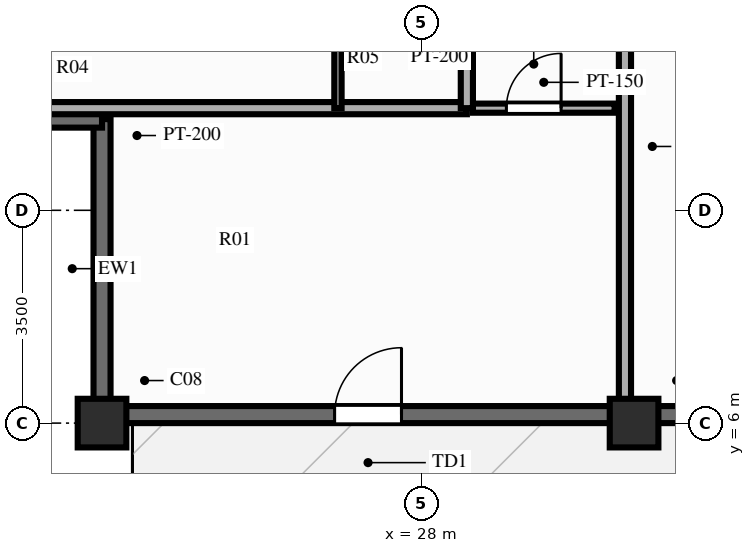
"""IFC4 building model, lengths in metres.
Left out: names, types, materials, properties, quantities, classifications, styles, units other than length and angle.
Written with IfcOpenShell. Run it as: python <this file> out.ifc"""

import sys

from ifc_helpers import new_model, si_unit, direction, frame, frame_2d, origin, origin_2d, place, context, subcontext, project, spatial, rectangle, extrude, source, transform, mapped, element, fill, save


model = new_model("IFC4")
c1 = context("Model", 3, precision=1e-05, world=origin(), true_north=direction((0.0, 1.0)))
c2 = subcontext(c1, "Body", "Model", "MODEL_VIEW")
j1 = project(units=[si_unit("LENGTHUNIT", "METRE"), si_unit("PLANEANGLEUNIT", "RADIAN")], contexts=[c1])
p1 = place(None, origin())
s1 = spatial("IfcSite", under=j1, at=p1, CompositionType="ELEMENT")
p2 = place(p1, origin())
s2 = spatial("IfcBuilding", under=s1, at=p2, CompositionType="ELEMENT")
p3 = place(p2, frame((0.0, 0.0, 172.9)))
s3 = spatial("IfcBuildingStorey", under=s2, at=p3, CompositionType="ELEMENT", Elevation=172.9)
m1 = source(origin(), c2, "Body", "SweptSolid", [
    extrude(rectangle(XDim=0.8, YDim=0.8, at=origin_2d()), origin(), (0.0, 0.0, 1.0), 3.9),
])
for number, where, z_axis, x_axis in (
    (1, (22.75, 6.0, 0.0), (0.0, 0.0, 1.0), (1.0, 0.0, 0.0)),
    (2, (31.5, 6.0, 0.0), (0.0, 0.0, 1.0), (1.0, 0.0, 0.0)),
):
    element("IfcColumn", number, at=place(p3, frame(where, z_axis=z_axis, x_axis=x_axis)), inside=s3, PredefinedType="COLUMN", context=c2, shape_type="MappedRepresentation", body=[
        mapped(m1, transform((0.0, 0.0, 0.0), scale=1.0)),
    ])
p4 = place(p3, frame((22.75, 6.14, 0.0), z_axis=(0.0, 0.0, 1.0), x_axis=(1.0, 0.0, 0.0)))
e3 = element("IfcWall", 3, at=p4, inside=s3, PredefinedType="SOLIDWALL", context=c2, shape_type="SweptSolid", body=[
    extrude(rectangle(XDim=30.5, YDim=0.28, at=frame_2d((15.25, 0.0))), origin(), (0.0, 0.0, 1.0), 2.79),
])
p5 = place(p4, frame((4.925, 0.0, 0.0), z_axis=(0.0, 0.0, 1.0), x_axis=(-1.0, 0.0, 0.0)))
e4 = element("IfcOpeningElement", 4, at=p5, cuts=e3, PredefinedType="OPENING", context=c2, shape_type="SweptSolid", body=[
    extrude(rectangle(XDim=1.1, YDim=2.15, at=frame_2d((0.55, 1.075))), frame((0.0, 0.152, 0.0), z_axis=(0.0, -1.0, 0.0), x_axis=(1.0, 0.0, 0.0)), (0.0, 0.0, 1.0), 0.304),
])
p6 = place(p4, frame((9.47, 0.0, 0.85)))
e5 = element("IfcOpeningElement", 5, at=p6, cuts=e3, PredefinedType="OPENING", context=c2, shape_type="SweptSolid", body=[
    extrude(rectangle(XDim=1.5, YDim=1.65, at=frame_2d((0.75, 0.825))), frame((0.0, 0.152, 0.0), z_axis=(0.0, -1.0, 0.0), x_axis=(1.0, 0.0, 0.0)), (0.0, 0.0, 1.0), 0.304),
])
p7 = place(p4, frame((12.45, 0.0, 0.85)))
e6 = element("IfcOpeningElement", 6, at=p7, cuts=e3, PredefinedType="OPENING", context=c2, shape_type="SweptSolid", body=[
    extrude(rectangle(XDim=1.8, YDim=1.65, at=frame_2d((0.9, 0.825))), frame((0.0, 0.152, 0.0), z_axis=(0.0, -1.0, 0.0), x_axis=(1.0, 0.0, 0.0)), (0.0, 0.0, 1.0), 0.304),
])
p8 = place(p4, frame((16.25, 0.0, 0.85)))
e7 = element("IfcOpeningElement", 7, at=p8, cuts=e3, PredefinedType="OPENING", context=c2, shape_type="SweptSolid", body=[
    extrude(rectangle(XDim=1.8, YDim=1.65, at=frame_2d((0.9, 0.825))), frame((0.0, 0.152, 0.0), z_axis=(0.0, -1.0, 0.0), x_axis=(1.0, 0.0, 0.0)), (0.0, 0.0, 1.0), 0.304),
])
p9 = place(p4, frame((19.53, 0.0, 0.85)))
e8 = element("IfcOpeningElement", 8, at=p9, cuts=e3, PredefinedType="OPENING", context=c2, shape_type="SweptSolid", body=[
    extrude(rectangle(XDim=1.5, YDim=1.65, at=frame_2d((0.75, 0.825))), frame((0.0, 0.152, 0.0), z_axis=(0.0, -1.0, 0.0), x_axis=(1.0, 0.0, 0.0)), (0.0, 0.0, 1.0), 0.304),
])
p10 = place(p4, frame((25.225, 0.0, 0.85)))
e9 = element("IfcOpeningElement", 9, at=p10, cuts=e3, PredefinedType="OPENING", context=c2, shape_type="SweptSolid", body=[
    extrude(rectangle(XDim=1.8, YDim=1.65, at=frame_2d((0.9, 0.825))), frame((0.0, 0.152, 0.0), z_axis=(0.0, -1.0, 0.0), x_axis=(1.0, 0.0, 0.0)), (0.0, 0.0, 1.0), 0.304),
])
for number, where, z_axis, x_axis in (
    (10, (22.75, 6.08, 0.0), (0.0, 0.0, 1.0), (0.0, 1.0, 0.0)),
    (11, (17.83, 11.0, 0.0), (0.0, 0.0, 1.0), (1.0, 0.0, 0.0)),
):
    element("IfcWall", number, at=place(p3, frame(where, z_axis=z_axis, x_axis=x_axis)), inside=s3, PredefinedType="SOLIDWALL", context=c2, shape_type="SweptSolid", body=[
        extrude(rectangle(XDim=4.92, YDim=0.28, at=frame_2d((2.46, 0.0))), origin(), (0.0, 0.0, 1.0), 2.79),
    ])
p11 = place(p3, frame((28.85, 11.18, 0.0), z_axis=(0.0, 0.0, 1.0), x_axis=(1.0, 0.0, 0.0)))
e12 = element("IfcWall", 12, at=p11, inside=s3, PredefinedType="PARTITIONING", context=c2, shape_type="SweptSolid", body=[
    extrude(rectangle(XDim=2.33, YDim=0.15, at=frame_2d((1.165, 0.0))), origin(), (0.0, 0.0, 1.0), 3.69),
])
p12 = place(p11, frame((0.55, 0.0, 0.0)))
e13 = element("IfcOpeningElement", 13, at=p12, cuts=e12, PredefinedType="OPENING", context=c2, shape_type="SweptSolid", body=[
    extrude(rectangle(XDim=0.9, YDim=2.1, at=frame_2d((0.45, 1.05))), frame((0.0, 0.087, 0.0), z_axis=(0.0, -1.0, 0.0), x_axis=(1.0, 0.0, 0.0)), (0.0, 0.0, 1.0), 0.174),
])
p13 = place(p3, frame((31.35, 14.95, 0.0), z_axis=(0.0, 0.0, 1.0), x_axis=(0.0, -1.0, 0.0)))
e14 = element("IfcWall", 14, at=p13, inside=s3, PredefinedType="PARTITIONING", context=c2, shape_type="SweptSolid", body=[
    extrude(rectangle(XDim=8.8, YDim=0.2, at=frame_2d((4.4, 0.0))), origin(), (0.0, 0.0, 1.0), 2.79),
])
p14 = place(p3, frame((28.75, 11.18, 0.0), z_axis=(0.0, 0.0, 1.0), x_axis=(-1.0, 0.0, 0.0)))
e15 = element("IfcWall", 15, at=p14, inside=s3, PredefinedType="PARTITIONING", context=c2, shape_type="SweptSolid", body=[
    extrude(rectangle(XDim=10.85, YDim=0.2, at=frame_2d((5.425, 0.0))), origin(), (0.0, 0.0, 1.0), 3.69),
])
p15 = place(p3, frame((28.75, 11.18, 0.0), z_axis=(0.0, 0.0, 1.0), x_axis=(0.0, 1.0, 0.0)))
e16 = element("IfcWall", 16, at=p15, inside=s3, PredefinedType="PARTITIONING", context=c2, shape_type="SweptSolid", body=[
    extrude(rectangle(XDim=2.75, YDim=0.2, at=frame_2d((1.375, 0.0))), origin(), (0.0, 0.0, 1.0), 3.69),
])
p16 = place(p3, frame((26.63, 11.18, 0.0), z_axis=(0.0, 0.0, 1.0), x_axis=(0.0, 1.0, 0.0)))
e17 = element("IfcWall", 17, at=p16, inside=s3, PredefinedType="PARTITIONING", context=c2, shape_type="SweptSolid", body=[
    extrude(rectangle(XDim=2.75, YDim=0.12, at=frame_2d((1.375, 0.0))), origin(), (0.0, 0.0, 1.0), 3.69),
])
m2 = source(origin(), c2, "Body", "SweptSolid", [
    extrude(rectangle(XDim=1.1, YDim=2.15, at=frame_2d((0.55, 1.075))), frame((0.0, 0.025, 0.0), z_axis=(0.0, -1.0, 0.0), x_axis=(1.0, 0.0, 0.0)), (0.0, 0.0, 1.0), 0.05),
])
p17 = place(p5, origin())
e18 = element("IfcDoor", 18, at=p17, inside=s3, OperationType="SINGLE_SWING_LEFT", PredefinedType="DOOR", context=c2, shape_type="MappedRepresentation", body=[
    mapped(m2, transform((0.0, 0.0, 0.0), scale=1.0)),
])
fill(e4, e18)
m3 = source(origin(), c2, "Body", "SweptSolid", [
    extrude(rectangle(XDim=0.9, YDim=2.1, at=frame_2d((0.45, 1.05))), frame((0.0, 0.025, 0.0), z_axis=(0.0, -1.0, 0.0), x_axis=(1.0, 0.0, 0.0)), (0.0, 0.0, 1.0), 0.05),
])
p18 = place(p12, origin())
e19 = element("IfcDoor", 19, at=p18, inside=s3, OperationType="SINGLE_SWING_RIGHT", PredefinedType="DOOR", context=c2, shape_type="MappedRepresentation", body=[
    mapped(m3, transform((0.0, 0.0, 0.0), scale=1.0)),
])
fill(e13, e19)
save(model, sys.argv[1])
